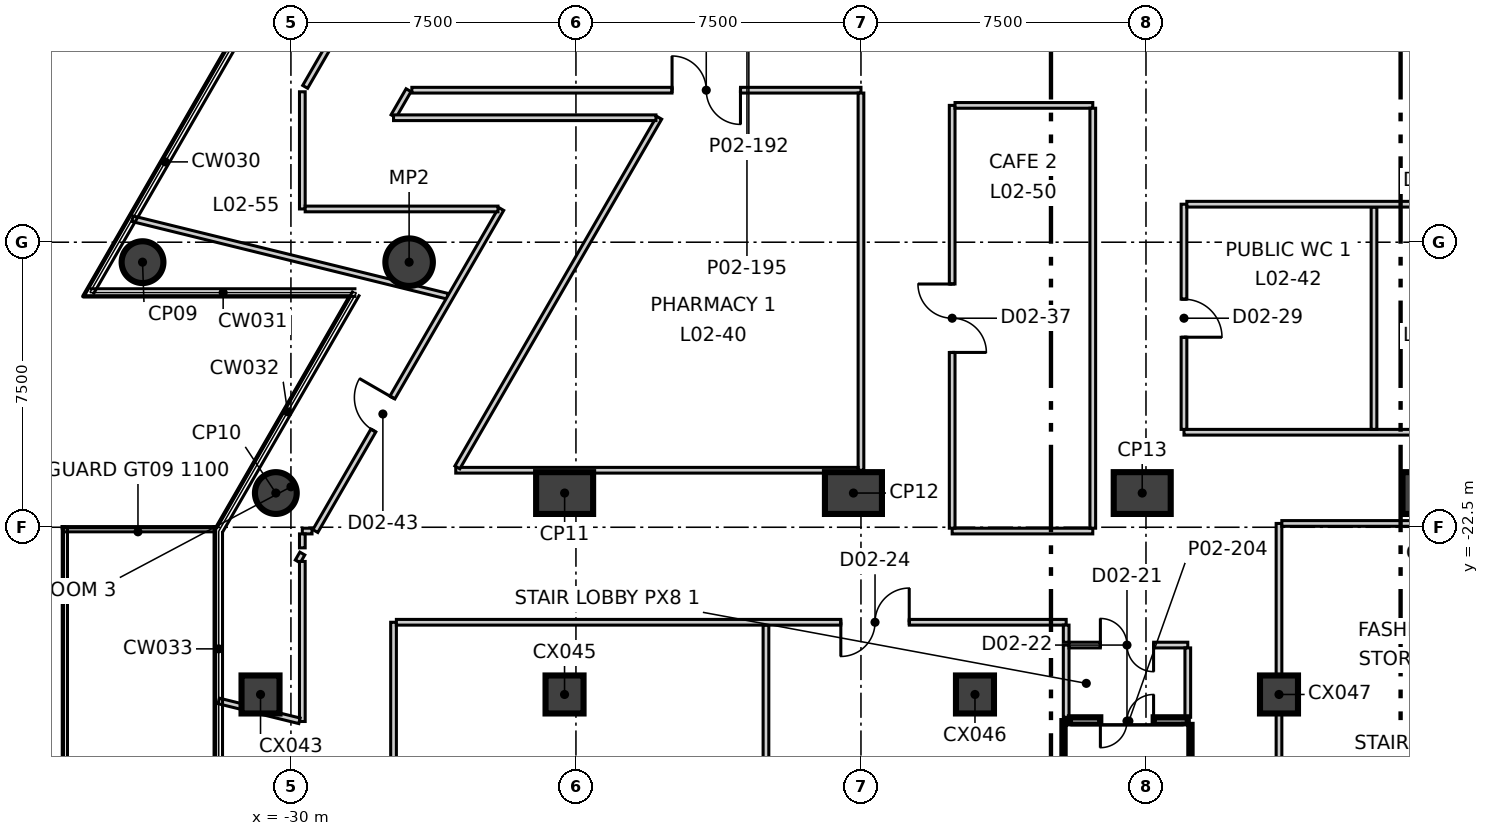
"""IFC4 building model, lengths in metres.
Left out: names, types, materials, properties, quantities, classifications, styles, units other than length and angle.
Written with IfcOpenShell. Run it as: python <this file> out.ifc"""

import sys

from ifc_helpers import new_model, si_unit, direction, frame, frame_2d, origin, origin_2d, place, context, subcontext, project, spatial, rectangle, circle, extrude, element, fill, save


model = new_model("IFC4")
c1 = context("Model", 3, precision=1e-05, world=origin(), true_north=direction((0.0, 1.0)))
c2 = subcontext(c1, "Body", "Model", "MODEL_VIEW")
j1 = project(units=[si_unit("LENGTHUNIT", "METRE"), si_unit("PLANEANGLEUNIT", "RADIAN")], contexts=[c1])
p1 = place(None, origin())
s1 = spatial("IfcSite", under=j1, at=p1, CompositionType="ELEMENT")
p2 = place(p1, origin())
s2 = spatial("IfcBuilding", under=s1, at=p2, CompositionType="ELEMENT")
p3 = place(p2, frame((0.0, 0.0, 14.5)))
s3 = spatial("IfcBuildingStorey", under=s2, at=p3, CompositionType="ELEMENT", Elevation=14.5)
for number, where, z_axis, x_axis in (
    (1, (-33.905, -15.525, -0.4), (0.0, 0.0, 1.0), (0.5, 0.866, 0.0)),
    (2, (-30.397, -21.6, -0.4), (0.0, 0.0, 1.0), (1.0, 0.0, 0.0)),
):
    element("IfcColumn", number, at=place(p3, frame(where, z_axis=z_axis, x_axis=x_axis)), inside=s3, PredefinedType="COLUMN", context=c2, shape_type="SweptSolid", body=[
        extrude(circle(Radius=0.55, at=origin_2d()), origin(), (0.0, 0.0, 1.0), 5.4),
    ])
for number, where, z_axis, x_axis in (
    (3, (-22.798, -21.6, -0.4), (0.0, 0.0, 1.0), (1.0, 0.0, 0.0)),
    (4, (-15.198, -21.6, -0.4), (0.0, 0.0, 1.0), (1.0, 0.0, 0.0)),
    (5, (-7.599, -21.6, -0.4), (0.0, 0.0, 1.0), (1.0, 0.0, 0.0)),
    (6, (0.0, -21.6, -0.4), (0.0, 0.0, 1.0), (1.0, 0.0, 0.0)),
):
    element("IfcColumn", number, at=place(p3, frame(where, z_axis=z_axis, x_axis=x_axis)), inside=s3, PredefinedType="COLUMN", context=c2, shape_type="SweptSolid", body=[
        extrude(rectangle(XDim=1.5, YDim=1.1, at=origin_2d()), origin(), (0.0, 0.0, 1.0), 5.4),
    ])
p4 = place(p3, frame((-26.89, -15.525, -0.4), z_axis=(0.0, 0.0, 1.0), x_axis=(1.0, 0.0, 0.0)))
e7 = element("IfcColumn", 7, at=p4, inside=s3, PredefinedType="COLUMN", context=c2, shape_type="SweptSolid", body=[
    extrude(circle(Radius=0.625, at=origin_2d()), origin(), (0.0, 0.0, 1.0), 5.4),
])
for number, where, z_axis, x_axis in (
    (8, (-30.8, -26.9, -0.4), (0.0, 0.0, 1.0), (1.0, 0.0, 0.0)),
    (9, (-22.8, -26.9, -0.4), (0.0, 0.0, 1.0), (1.0, 0.0, 0.0)),
    (10, (-12.0, -26.9, -0.4), (0.0, 0.0, 1.0), (1.0, 0.0, 0.0)),
    (11, (-4.0, -26.9, -0.4), (0.0, 0.0, 1.0), (1.0, 0.0, 0.0)),
):
    element("IfcColumn", number, at=place(p3, frame(where, z_axis=z_axis, x_axis=x_axis)), inside=s3, PredefinedType="COLUMN", context=c2, shape_type="SweptSolid", body=[
        extrude(rectangle(XDim=1.0, YDim=1.0, at=origin_2d()), origin(), (0.0, 0.0, 1.0), 5.4),
    ])
p5 = place(p3, frame((-9.6, -27.5, 0.0), z_axis=(0.0, 0.0, 1.0), x_axis=(0.0, 1.0, 0.0)))
e12 = element("IfcWall", 12, at=p5, inside=s3, PredefinedType="PARTITIONING", context=c2, shape_type="SweptSolid", body=[
    extrude(rectangle(XDim=1.9, YDim=0.15, at=frame_2d((0.95, 0.0))), origin(), (0.0, 0.0, 1.0), 5.0),
])
p6 = place(p3, frame((-9.525, -25.6, 0.0), z_axis=(0.0, 0.0, 1.0), x_axis=(1.0, 0.0, 0.0)))
e13 = element("IfcWall", 13, at=p6, inside=s3, PredefinedType="PARTITIONING", context=c2, shape_type="SweptSolid", body=[
    extrude(rectangle(XDim=3.125, YDim=0.15, at=frame_2d((1.562, 0.0))), origin(), (0.0, 0.0, 1.0), 5.0),
])
p7 = place(p6, frame((0.825, 0.0, 0.0)))
e14 = element("IfcOpeningElement", 14, at=p7, cuts=e13, PredefinedType="OPENING", context=c2, shape_type="SweptSolid", body=[
    extrude(rectangle(XDim=1.4, YDim=2.1, at=frame_2d((0.7, 1.05))), frame((0.0, 0.085, 0.0), z_axis=(0.0, -1.0, 0.0), x_axis=(1.0, 0.0, 0.0)), (0.0, 0.0, 1.0), 0.17),
])
p8 = place(p3, frame((-6.4, -27.5, 0.0), z_axis=(0.0, 0.0, 1.0), x_axis=(0.0, 1.0, 0.0)))
e15 = element("IfcWall", 15, at=p8, inside=s3, PredefinedType="PARTITIONING", context=c2, shape_type="SweptSolid", body=[
    extrude(rectangle(XDim=1.825, YDim=0.15, at=frame_2d((0.913, 0.0))), origin(), (0.0, 0.0, 1.0), 5.0),
])
p9 = place(p3, frame((-34.169, -14.382, 0.0), z_axis=(0.0, 0.0, 1.0), x_axis=(0.971037336003, -0.238927796809, 0.0)))
e16 = element("IfcWall", 16, at=p9, inside=s3, PredefinedType="PARTITIONING", context=c2, shape_type="SweptSolid", body=[
    extrude(rectangle(XDim=8.538, YDim=0.15, at=frame_2d((4.269, 0.0))), origin(), (0.0, 0.0, 1.0), 4.1),
])
p10 = place(p3, frame((-29.82, -23.4, 0.0), z_axis=(0.0, 0.0, 1.0), x_axis=(0.500074377092, 0.865982457891, 0.0)))
e17 = element("IfcWall", 17, at=p10, inside=s3, PredefinedType="PARTITIONING", context=c2, shape_type="SweptSolid", body=[
    extrude(rectangle(XDim=0.24, YDim=0.15, at=frame_2d((0.12, 0.0))), origin(), (0.0, 0.0, 1.0), 5.0),
])
p11 = place(p3, frame((-29.358, -22.6, 0.0), z_axis=(0.0, 0.0, 1.0), x_axis=(0.499903869937, 0.866080897389, 0.0)))
e18 = element("IfcWall", 18, at=p11, inside=s3, PredefinedType="PARTITIONING", context=c2, shape_type="SweptSolid", body=[
    extrude(rectangle(XDim=9.786, YDim=0.15, at=frame_2d((4.893, 0.0))), origin(), (0.0, 0.0, 1.0), 5.0),
])
p12 = place(p11, frame((3.056, 0.0, 0.0)))
e19 = element("IfcOpeningElement", 19, at=p12, cuts=e18, PredefinedType="OPENING", context=c2, shape_type="SweptSolid", body=[
    extrude(rectangle(XDim=1.0, YDim=2.1, at=frame_2d((0.5, 1.05))), frame((0.0, 0.085, 0.0), z_axis=(0.0, -1.0, 0.0), x_axis=(1.0, 0.0, 0.0)), (0.0, 0.0, 1.0), 0.17),
])
p13 = place(p3, frame((-29.7, -22.6, 0.0), z_axis=(0.0, 0.0, 1.0), x_axis=(1.0, 0.0, 0.0)))
e20 = element("IfcWall", 20, at=p13, inside=s3, PredefinedType="PARTITIONING", context=c2, shape_type="SweptSolid", body=[
    extrude(rectangle(XDim=0.255, YDim=0.15, at=frame_2d((0.127, 0.0))), origin(), (0.0, 0.0, 1.0), 5.0),
])
p14 = place(p3, frame((-12.6, -22.6, 0.0), z_axis=(0.0, 0.0, 1.0), x_axis=(1.0, 0.0, 0.0)))
e21 = element("IfcWall", 21, at=p14, inside=s3, PredefinedType="PARTITIONING", context=c2, shape_type="SweptSolid", body=[
    extrude(rectangle(XDim=3.7, YDim=0.15, at=frame_2d((1.85, 0.0))), origin(), (0.0, 0.0, 1.0), 5.0),
])
p15 = place(p3, frame((-29.7, -27.611, 0.0), z_axis=(0.0, 0.0, 1.0), x_axis=(0.0, 1.0, 0.0)))
e22 = element("IfcWall", 22, at=p15, inside=s3, PredefinedType="PARTITIONING", context=c2, shape_type="SweptSolid", body=[
    extrude(rectangle(XDim=4.211, YDim=0.15, at=frame_2d((2.105, 0.0))), origin(), (0.0, 0.0, 1.0), 5.0),
])
p16 = place(p3, frame((-29.7, -23.042, 0.0), z_axis=(0.0, 0.0, 1.0), x_axis=(0.0, 1.0, 0.0)))
e23 = element("IfcWall", 23, at=p16, inside=s3, PredefinedType="PARTITIONING", context=c2, shape_type="SweptSolid", body=[
    extrude(rectangle(XDim=0.367, YDim=0.15, at=frame_2d((0.184, 0.0))), origin(), (0.0, 0.0, 1.0), 5.0),
])
p17 = place(p3, frame((-29.7, -14.125, 0.0), z_axis=(0.0, 0.0, 1.0), x_axis=(0.0, 1.0, 0.0)))
e24 = element("IfcWall", 24, at=p17, inside=s3, PredefinedType="PARTITIONING", context=c2, shape_type="SweptSolid", body=[
    extrude(rectangle(XDim=3.083, YDim=0.15, at=frame_2d((1.542, 0.0))), origin(), (0.0, 0.0, 1.0), 5.0),
])
p18 = place(p3, frame((-31.9, -27.07, 0.0), z_axis=(0.0, 0.0, 1.0), x_axis=(0.971028421066, -0.238964025497, 0.0)))
e25 = element("IfcWall", 25, at=p18, inside=s3, PredefinedType="PARTITIONING", context=c2, shape_type="SweptSolid", body=[
    extrude(rectangle(XDim=2.188, YDim=0.15, at=frame_2d((1.094, 0.0))), origin(), (0.0, 0.0, 1.0), 5.0),
])
p19 = place(p3, frame((-29.625, -10.912, 0.0), z_axis=(0.0, 0.0, 1.0), x_axis=(0.499839737655, 0.866117911523, 0.0)))
e26 = element("IfcWall", 26, at=p19, inside=s3, PredefinedType="PARTITIONING", context=c2, shape_type="SweptSolid", body=[
    extrude(rectangle(XDim=2.583, YDim=0.15, at=frame_2d((1.292, 0.0))), origin(), (0.0, 0.0, 1.0), 5.0),
])
p20 = place(p3, frame((-29.625, -14.125, 0.0), z_axis=(0.0, 0.0, 1.0), x_axis=(1.0, 0.0, 0.0)))
e27 = element("IfcWall", 27, at=p20, inside=s3, PredefinedType="PARTITIONING", context=c2, shape_type="SweptSolid", body=[
    extrude(rectangle(XDim=5.073, YDim=0.15, at=frame_2d((2.537, 0.0))), origin(), (0.0, 0.0, 1.0), 5.0),
])
p21 = place(p3, frame((-17.5, -34.525, 0.0), z_axis=(0.0, 0.0, 1.0), x_axis=(0.0, 1.0, 0.0)))
e28 = element("IfcWall", 28, at=p21, inside=s3, PredefinedType="PARTITIONING", context=c2, shape_type="SweptSolid", body=[
    extrude(rectangle(XDim=9.45, YDim=0.15, at=frame_2d((4.725, 0.0))), origin(), (0.0, 0.0, 1.0), 5.0),
])
p22 = place(p3, frame((-27.3, -34.525, 0.0), z_axis=(0.0, 0.0, 1.0), x_axis=(0.0, 1.0, 0.0)))
e29 = element("IfcWall", 29, at=p22, inside=s3, PredefinedType="PARTITIONING", context=c2, shape_type="SweptSolid", body=[
    extrude(rectangle(XDim=9.525, YDim=0.15, at=frame_2d((4.762, 0.0))), origin(), (0.0, 0.0, 1.0), 5.0),
])
p23 = place(p3, frame((-27.225, -25.0, 0.0), z_axis=(0.0, 0.0, 1.0), x_axis=(1.0, 0.0, 0.0)))
e30 = element("IfcWall", 30, at=p23, inside=s3, PredefinedType="PARTITIONING", context=c2, shape_type="SweptSolid", body=[
    extrude(rectangle(XDim=17.625, YDim=0.15, at=frame_2d((8.812, 0.0))), origin(), (0.0, 0.0, 1.0), 5.0),
])
p24 = place(p23, frame((11.695, 0.0, 0.0)))
e31 = element("IfcOpeningElement", 31, at=p24, cuts=e30, PredefinedType="OPENING", context=c2, shape_type="SweptSolid", body=[
    extrude(rectangle(XDim=1.8, YDim=2.1, at=frame_2d((0.9, 1.05))), frame((0.0, 0.085, 0.0), z_axis=(0.0, -1.0, 0.0), x_axis=(1.0, 0.0, 0.0)), (0.0, 0.0, 1.0), 0.17),
])
p25 = place(p3, frame((-9.6, -25.527, 0.0), z_axis=(0.0, 0.0, 1.0), x_axis=(0.0, 1.0, 0.0)))
e32 = element("IfcWall", 32, at=p25, inside=s3, PredefinedType="PARTITIONING", context=c2, shape_type="SweptSolid", body=[
    extrude(rectangle(XDim=0.452, YDim=0.15, at=frame_2d((0.226, 0.0))), origin(), (0.0, 0.0, 1.0), 5.0),
])
p26 = place(p3, frame((-4.0, -32.0, 0.0), z_axis=(0.0, 0.0, 1.0), x_axis=(0.0, 1.0, 0.0)))
e33 = element("IfcWall", 33, at=p26, inside=s3, PredefinedType="PARTITIONING", context=c2, shape_type="SweptSolid", body=[
    extrude(rectangle(XDim=9.6, YDim=0.15, at=frame_2d((4.8, 0.0))), origin(), (0.0, 0.0, 1.0), 3.2),
])
p27 = place(p3, frame((-3.925, -22.4, 0.0), z_axis=(0.0, 0.0, 1.0), x_axis=(1.0, 0.0, 0.0)))
e34 = element("IfcWall", 34, at=p27, inside=s3, PredefinedType="PARTITIONING", context=c2, shape_type="SweptSolid", body=[
    extrude(rectangle(XDim=7.925, YDim=0.15, at=frame_2d((3.962, 0.0))), origin(), (0.0, 0.0, 1.0), 5.0),
])
p28 = place(p3, frame((-6.5, -20.0, 0.0), z_axis=(0.0, 0.0, 1.0), x_axis=(1.0, 0.0, 0.0)))
e35 = element("IfcWall", 35, at=p28, inside=s3, PredefinedType="PARTITIONING", context=c2, shape_type="SweptSolid", body=[
    extrude(rectangle(XDim=13.3, YDim=0.15, at=frame_2d((6.65, 0.0))), origin(), (0.0, 0.0, 1.0), 5.0),
])
p29 = place(p3, frame((-1.5, -19.925, 0.0), z_axis=(0.0, 0.0, 1.0), x_axis=(0.0, 1.0, 0.0)))
e36 = element("IfcWall", 36, at=p29, inside=s3, PredefinedType="PARTITIONING", context=c2, shape_type="SweptSolid", body=[
    extrude(rectangle(XDim=5.85, YDim=0.15, at=frame_2d((2.925, 0.0))), origin(), (0.0, 0.0, 1.0), 5.0),
])
p30 = place(p3, frame((-6.5, -19.925, 0.0), z_axis=(0.0, 0.0, 1.0), x_axis=(0.0, 1.0, 0.0)))
e37 = element("IfcWall", 37, at=p30, inside=s3, PredefinedType="PARTITIONING", context=c2, shape_type="SweptSolid", body=[
    extrude(rectangle(XDim=5.925, YDim=0.15, at=frame_2d((2.962, 0.0))), origin(), (0.0, 0.0, 1.0), 5.0),
])
p31 = place(p30, frame((2.425, 0.0, 0.0)))
e38 = element("IfcOpeningElement", 38, at=p31, cuts=e37, PredefinedType="OPENING", context=c2, shape_type="SweptSolid", body=[
    extrude(rectangle(XDim=1.0, YDim=2.1, at=frame_2d((0.5, 1.05))), frame((0.0, 0.085, 0.0), z_axis=(0.0, -1.0, 0.0), x_axis=(1.0, 0.0, 0.0)), (0.0, 0.0, 1.0), 0.17),
])
p32 = place(p3, frame((-6.425, -14.0, 0.0), z_axis=(0.0, 0.0, 1.0), x_axis=(1.0, 0.0, 0.0)))
e39 = element("IfcWall", 39, at=p32, inside=s3, PredefinedType="PARTITIONING", context=c2, shape_type="SweptSolid", body=[
    extrude(rectangle(XDim=13.225, YDim=0.15, at=frame_2d((6.613, 0.0))), origin(), (0.0, 0.0, 1.0), 5.0),
])
p33 = place(p32, frame((6.125, 0.0, 0.0)))
e40 = element("IfcOpeningElement", 40, at=p33, cuts=e39, PredefinedType="OPENING", context=c2, shape_type="SweptSolid", body=[
    extrude(rectangle(XDim=1.0, YDim=2.1, at=frame_2d((0.5, 1.05))), frame((0.0, 0.085, 0.0), z_axis=(0.0, -1.0, 0.0), x_axis=(1.0, 0.0, 0.0)), (0.0, 0.0, 1.0), 0.17),
])
p34 = place(p3, frame((-27.3, -11.685, 0.0), z_axis=(0.0, 0.0, 1.0), x_axis=(0.499526442893, 0.866298639529, 0.0)))
e41 = element("IfcWall", 41, at=p34, inside=s3, PredefinedType="PARTITIONING", context=c2, shape_type="SweptSolid", body=[
    extrude(rectangle(XDim=0.791, YDim=0.15, at=frame_2d((0.396, 0.0))), origin(), (0.0, 0.0, 1.0), 5.0),
])
p35 = place(p3, frame((-26.818, -11.0, 0.0), z_axis=(0.0, 0.0, 1.0), x_axis=(1.0, 0.0, 0.0)))
e42 = element("IfcWall", 42, at=p35, inside=s3, PredefinedType="PARTITIONING", context=c2, shape_type="SweptSolid", body=[
    extrude(rectangle(XDim=11.818, YDim=0.15, at=frame_2d((5.909, 0.0))), origin(), (0.0, 0.0, 1.0), 5.0),
])
p36 = place(p35, frame((6.847, 0.0, 0.0)))
e43 = element("IfcOpeningElement", 43, at=p36, cuts=e42, PredefinedType="OPENING", context=c2, shape_type="SweptSolid", body=[
    extrude(rectangle(XDim=1.8, YDim=2.1, at=frame_2d((0.9, 1.05))), frame((0.0, 0.085, 0.0), z_axis=(0.0, -1.0, 0.0), x_axis=(1.0, 0.0, 0.0)), (0.0, 0.0, 1.0), 0.17),
])
p37 = place(p3, frame((-15.0, -21.0, 0.0), z_axis=(0.0, 0.0, 1.0), x_axis=(0.0, 1.0, 0.0)))
e44 = element("IfcWall", 44, at=p37, inside=s3, PredefinedType="PARTITIONING", context=c2, shape_type="SweptSolid", body=[
    extrude(rectangle(XDim=9.925, YDim=0.15, at=frame_2d((4.962, 0.0))), origin(), (0.0, 0.0, 1.0), 5.0),
])
p38 = place(p3, frame((-25.663, -21.0, 0.0), z_axis=(0.0, 0.0, 1.0), x_axis=(1.0, 0.0, 0.0)))
e45 = element("IfcWall", 45, at=p38, inside=s3, PredefinedType="PARTITIONING", context=c2, shape_type="SweptSolid", body=[
    extrude(rectangle(XDim=10.588, YDim=0.15, at=frame_2d((5.294, 0.0))), origin(), (0.0, 0.0, 1.0), 5.0),
])
p39 = place(p3, frame((-25.62, -20.925, 0.0), z_axis=(0.0, 0.0, 1.0), x_axis=(0.499960523757, 0.866048194205, 0.0)))
e46 = element("IfcWall", 46, at=p39, inside=s3, PredefinedType="PARTITIONING", context=c2, shape_type="SweptSolid", body=[
    extrude(rectangle(XDim=10.623, YDim=0.15, at=frame_2d((5.312, 0.0))), origin(), (0.0, 0.0, 1.0), 5.0),
])
p40 = place(p3, frame((-27.3, -11.725, 0.0), z_axis=(0.0, 0.0, 1.0), x_axis=(1.0, 0.0, 0.0)))
e47 = element("IfcWall", 47, at=p40, inside=s3, PredefinedType="PARTITIONING", context=c2, shape_type="SweptSolid", body=[
    extrude(rectangle(XDim=6.905, YDim=0.15, at=frame_2d((3.453, 0.0))), origin(), (0.0, 0.0, 1.0), 5.0),
])
p41 = place(p3, frame((-12.6, -22.525, 0.0), z_axis=(0.0, 0.0, 1.0), x_axis=(0.0, 1.0, 0.0)))
e48 = element("IfcWall", 48, at=p41, inside=s3, PredefinedType="PARTITIONING", context=c2, shape_type="SweptSolid", body=[
    extrude(rectangle(XDim=11.125, YDim=0.15, at=frame_2d((5.562, 0.0))), origin(), (0.0, 0.0, 1.0), 5.0),
])
p42 = place(p41, frame((4.625, 0.0, 0.0)))
e49 = element("IfcOpeningElement", 49, at=p42, cuts=e48, PredefinedType="OPENING", context=c2, shape_type="SweptSolid", body=[
    extrude(rectangle(XDim=1.8, YDim=2.1, at=frame_2d((0.9, 1.05))), frame((0.0, 0.085, 0.0), z_axis=(0.0, -1.0, 0.0), x_axis=(1.0, 0.0, 0.0)), (0.0, 0.0, 1.0), 0.17),
])
p43 = place(p3, frame((-12.525, -11.4, 0.0), z_axis=(0.0, 0.0, 1.0), x_axis=(1.0, 0.0, 0.0)))
e50 = element("IfcWall", 50, at=p43, inside=s3, PredefinedType="PARTITIONING", context=c2, shape_type="SweptSolid", body=[
    extrude(rectangle(XDim=3.625, YDim=0.15, at=frame_2d((1.812, 0.0))), origin(), (0.0, 0.0, 1.0), 5.0),
])
p44 = place(p3, frame((-8.9, -22.525, 0.0), z_axis=(0.0, 0.0, 1.0), x_axis=(0.0, 1.0, 0.0)))
e51 = element("IfcWall", 51, at=p44, inside=s3, PredefinedType="PARTITIONING", context=c2, shape_type="SweptSolid", body=[
    extrude(rectangle(XDim=11.05, YDim=0.15, at=frame_2d((5.525, 0.0))), origin(), (0.0, 0.0, 1.0), 5.0),
])
p45 = place(p3, frame((-9.6, -33.4, 0.0), z_axis=(0.0, 0.0, 1.0), x_axis=(0.0, 1.0, 0.0)))
e52 = element("IfcWall", 52, at=p45, inside=s3, PredefinedType="SOLIDWALL", context=c2, shape_type="SweptSolid", body=[
    extrude(rectangle(XDim=5.8, YDim=0.2, at=frame_2d((2.9, 0.0))), origin(), (0.0, 0.0, 1.0), 5.0),
])
p46 = place(p3, frame((-9.5, -27.6, 0.0), z_axis=(0.0, 0.0, 1.0), x_axis=(1.0, 0.0, 0.0)))
e53 = element("IfcWall", 53, at=p46, inside=s3, PredefinedType="SOLIDWALL", context=c2, shape_type="SweptSolid", body=[
    extrude(rectangle(XDim=3.1, YDim=0.2, at=frame_2d((1.55, 0.0))), origin(), (0.0, 0.0, 1.0), 5.0),
])
p47 = place(p46, frame((0.8, 0.0, 0.0)))
e54 = element("IfcOpeningElement", 54, at=p47, cuts=e53, PredefinedType="OPENING", context=c2, shape_type="SweptSolid", body=[
    extrude(rectangle(XDim=1.4, YDim=2.1, at=frame_2d((0.7, 1.05))), frame((0.0, 0.11, 0.0), z_axis=(0.0, -1.0, 0.0), x_axis=(1.0, 0.0, 0.0)), (0.0, 0.0, 1.0), 0.22),
])
p48 = place(p3, frame((-6.4, -33.4, 0.0), z_axis=(0.0, 0.0, 1.0), x_axis=(0.0, 1.0, 0.0)))
e55 = element("IfcWall", 55, at=p48, inside=s3, PredefinedType="SOLIDWALL", context=c2, shape_type="SweptSolid", body=[
    extrude(rectangle(XDim=5.7, YDim=0.2, at=frame_2d((2.85, 0.0))), origin(), (0.0, 0.0, 1.0), 5.0),
])
p49 = place(p47, origin())
e56 = element("IfcDoor", 56, at=p49, inside=s3, OperationType="DOUBLE_DOOR_SINGLE_SWING", PredefinedType="DOOR", context=c2, shape_type="SweptSolid", body=[
    extrude(rectangle(XDim=1.4, YDim=2.1, at=frame_2d((0.7, 1.05))), frame((0.0, 0.025, 0.0), z_axis=(0.0, -1.0, 0.0), x_axis=(1.0, 0.0, 0.0)), (0.0, 0.0, 1.0), 0.05),
])
fill(e54, e56)
p50 = place(p7, origin())
e57 = element("IfcDoor", 57, at=p50, inside=s3, OperationType="DOUBLE_DOOR_SINGLE_SWING", PredefinedType="DOOR", context=c2, shape_type="SweptSolid", body=[
    extrude(rectangle(XDim=1.4, YDim=2.1, at=frame_2d((0.7, 1.05))), frame((0.0, 0.025, 0.0), z_axis=(0.0, -1.0, 0.0), x_axis=(1.0, 0.0, 0.0)), (0.0, 0.0, 1.0), 0.05),
])
fill(e14, e57)
p51 = place(p24, origin())
e58 = element("IfcDoor", 58, at=p51, inside=s3, OperationType="DOUBLE_DOOR_SINGLE_SWING", PredefinedType="DOOR", context=c2, shape_type="SweptSolid", body=[
    extrude(rectangle(XDim=1.8, YDim=2.1, at=frame_2d((0.9, 1.05))), frame((0.0, 0.025, 0.0), z_axis=(0.0, -1.0, 0.0), x_axis=(1.0, 0.0, 0.0)), (0.0, 0.0, 1.0), 0.05),
])
fill(e31, e58)
p52 = place(p36, origin())
e59 = element("IfcDoor", 59, at=p52, inside=s3, OperationType="DOUBLE_DOOR_SINGLE_SWING", PredefinedType="DOOR", context=c2, shape_type="SweptSolid", body=[
    extrude(rectangle(XDim=1.8, YDim=2.1, at=frame_2d((0.9, 1.05))), frame((0.0, 0.025, 0.0), z_axis=(0.0, -1.0, 0.0), x_axis=(1.0, 0.0, 0.0)), (0.0, 0.0, 1.0), 0.05),
])
fill(e43, e59)
p53 = place(p31, origin())
e60 = element("IfcDoor", 60, at=p53, inside=s3, OperationType="SINGLE_SWING_LEFT", PredefinedType="DOOR", context=c2, shape_type="SweptSolid", body=[
    extrude(rectangle(XDim=1.0, YDim=2.1, at=frame_2d((0.5, 1.05))), frame((0.0, 0.025, 0.0), z_axis=(0.0, -1.0, 0.0), x_axis=(1.0, 0.0, 0.0)), (0.0, 0.0, 1.0), 0.05),
])
fill(e38, e60)
p54 = place(p42, origin())
e61 = element("IfcDoor", 61, at=p54, inside=s3, OperationType="DOUBLE_DOOR_SINGLE_SWING", PredefinedType="DOOR", context=c2, shape_type="SweptSolid", body=[
    extrude(rectangle(XDim=1.8, YDim=2.1, at=frame_2d((0.9, 1.05))), frame((0.0, 0.025, 0.0), z_axis=(0.0, -1.0, 0.0), x_axis=(1.0, 0.0, 0.0)), (0.0, 0.0, 1.0), 0.05),
])
fill(e49, e61)
p55 = place(p12, origin())
e62 = element("IfcDoor", 62, at=p55, inside=s3, OperationType="SINGLE_SWING_LEFT", PredefinedType="DOOR", context=c2, shape_type="SweptSolid", body=[
    extrude(rectangle(XDim=1.0, YDim=2.1, at=frame_2d((0.5, 1.05))), frame((0.0, 0.025, 0.0), z_axis=(0.0, -1.0, 0.0), x_axis=(1.0, 0.0, 0.0)), (0.0, 0.0, 1.0), 0.05),
])
fill(e19, e62)
save(model, sys.argv[1])
